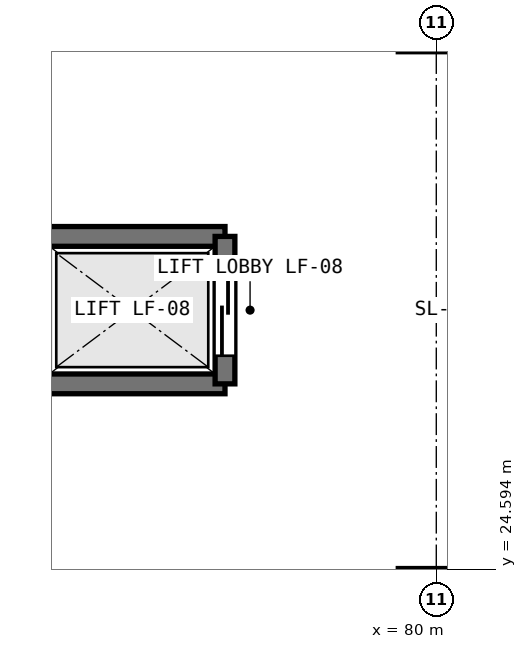
"""IFC4 building model, lengths in metres.
Left out: names, types, materials, properties, quantities, classifications, styles, units other than length and angle.
Written with IfcOpenShell. Run it as: python <this file> out.ifc"""

import sys

from ifc_helpers import new_model, si_unit, direction, frame, frame_2d, origin, place, context, subcontext, project, spatial, rectangle, extrude, element, fill, save


model = new_model("IFC4")
c1 = context("Model", 3, precision=1e-05, world=origin(), true_north=direction((0.0, 1.0)))
c2 = subcontext(c1, "Body", "Model", "MODEL_VIEW")
j1 = project(units=[si_unit("LENGTHUNIT", "METRE"), si_unit("PLANEANGLEUNIT", "RADIAN")], contexts=[c1])
p1 = place(None, origin())
s1 = spatial("IfcSite", under=j1, at=p1, CompositionType="ELEMENT")
p2 = place(p1, origin())
s2 = spatial("IfcBuilding", under=s1, at=p2, CompositionType="ELEMENT")
p3 = place(p2, frame((0.0, 0.0, 15.0)))
s3 = spatial("IfcBuildingStorey", under=s2, at=p3, CompositionType="ELEMENT", Elevation=15.0)
for number, where, z_axis, x_axis in (
    (1, (74.78, 28.97, 0.0), (0.0, 0.0, 1.0), (1.0, 0.0, 0.0)),
    (2, (77.22, 27.03, 0.0), (0.0, 0.0, 1.0), (-1.0, 0.0, 0.0)),
):
    element("IfcWall", number, at=place(p3, frame(where, z_axis=z_axis, x_axis=x_axis)), inside=s3, PredefinedType="SHEAR", context=c2, shape_type="SweptSolid", body=[
        extrude(rectangle(XDim=2.44, YDim=0.26, at=frame_2d((1.22, 0.0))), origin(), (0.0, 0.0, 1.0), 4.5),
    ])
p4 = place(p3, frame((77.22, 28.97, 0.0), z_axis=(0.0, 0.0, 1.0), x_axis=(0.0, -1.0, 0.0)))
e3 = element("IfcWall", 3, at=p4, inside=s3, PredefinedType="SHEAR", context=c2, shape_type="SweptSolid", body=[
    extrude(rectangle(XDim=1.94, YDim=0.26, at=frame_2d((0.97, 0.0))), origin(), (0.0, 0.0, 1.0), 4.5),
])
p5 = place(p4, frame((0.37, 0.0, 0.0)))
e4 = element("IfcOpeningElement", 4, at=p5, cuts=e3, PredefinedType="OPENING", context=c2, shape_type="SweptSolid", body=[
    extrude(rectangle(XDim=1.2, YDim=2.15, at=frame_2d((0.6, 1.075))), frame((0.0, 0.14, 0.0), z_axis=(0.0, -1.0, 0.0), x_axis=(1.0, 0.0, 0.0)), (0.0, 0.0, 1.0), 0.28),
])
p6 = place(p5, origin())
e5 = element("IfcDoor", 5, at=p6, inside=s3, OperationType="SLIDING_TO_LEFT", PredefinedType="DOOR", context=c2, shape_type="SweptSolid", body=[
    extrude(rectangle(XDim=1.2, YDim=2.15, at=frame_2d((0.6, 1.075))), frame((0.0, 0.025, 0.0), z_axis=(0.0, -1.0, 0.0), x_axis=(1.0, 0.0, 0.0)), (0.0, 0.0, 1.0), 0.05),
])
fill(e4, e5)
save(model, sys.argv[1])
